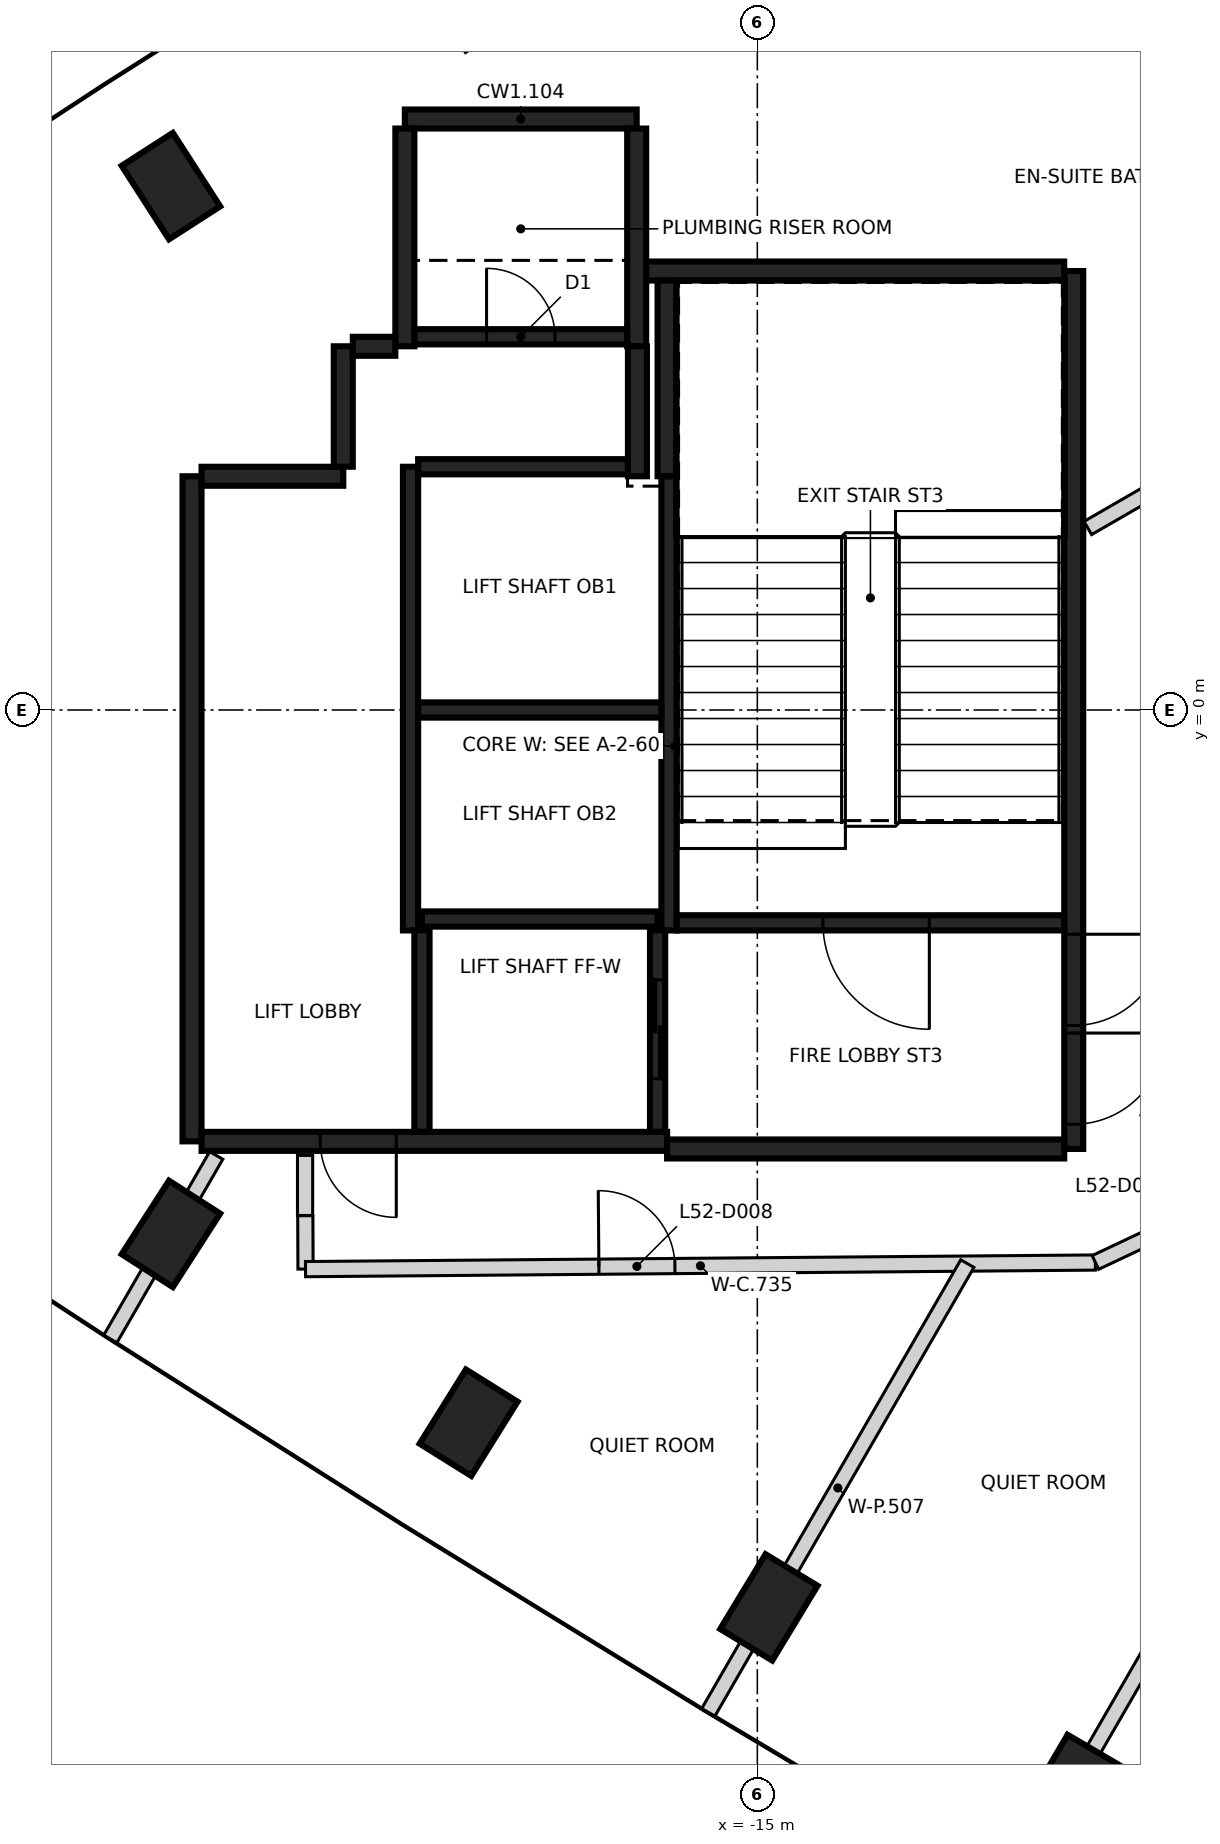
"""IFC4 building model, lengths in metres.
Left out: names, types, materials, properties, quantities, classifications, styles, units other than length and angle.
Written with IfcOpenShell. Run it as: python <this file> out.ifc"""

import sys

from ifc_helpers import new_model, si_unit, direction, frame, frame_2d, origin, origin_2d, place, context, subcontext, project, spatial, rectangle, extrude, element, fill, save


model = new_model("IFC4")
c1 = context("Model", 3, precision=1e-05, world=origin(), true_north=direction((0.0, 1.0)))
c2 = subcontext(c1, "Body", "Model", "MODEL_VIEW")
j1 = project(units=[si_unit("LENGTHUNIT", "METRE"), si_unit("PLANEANGLEUNIT", "RADIAN")], contexts=[c1])
p1 = place(None, origin())
s1 = spatial("IfcSite", under=j1, at=p1, CompositionType="ELEMENT")
p2 = place(p1, origin())
s2 = spatial("IfcBuilding", under=s1, at=p2, CompositionType="ELEMENT")
p3 = place(p2, frame((0.0, 0.0, 208.0)))
s3 = spatial("IfcBuildingStorey", under=s2, at=p3, CompositionType="ELEMENT", Elevation=208.0)
for number, where, z_axis, x_axis in (
    (1, (-22.715, 6.892, -0.35), (0.0, 0.0, 1.0), (-0.541, 0.841, 0.0)),
    (2, (-22.715, -6.892, -0.35), (0.0, 0.0, 1.0), (0.541, 0.841, 0.0)),
    (3, (-18.799, -9.376, -0.35), (0.0, 0.0, 1.0), (0.529, 0.848, 0.0)),
    (4, (-14.848, -11.806, -0.35), (0.0, 0.0, 1.0), (0.518, 0.855, 0.0)),
    (5, (-10.864, -14.18, -0.35), (0.0, 0.0, 1.0), (0.506, 0.862, 0.0)),
):
    element("IfcColumn", number, at=place(p3, frame(where, z_axis=z_axis, x_axis=x_axis)), inside=s3, PredefinedType="COLUMN", context=c2, shape_type="SweptSolid", body=[
        extrude(rectangle(XDim=1.15, YDim=0.8, at=origin_2d()), origin(), (0.0, 0.0, 1.0), 2.736),
    ])
p4 = place(p3, frame((-10.837, 5.775, 0.0), z_axis=(0.0, 0.0, 1.0), x_axis=(0.0, -1.0, 0.0)))
e6 = element("IfcWall", 6, at=p4, inside=s3, PredefinedType="SHEAR", context=c2, shape_type="SweptSolid", body=[
    extrude(rectangle(XDim=11.55, YDim=0.25, at=frame_2d((5.775, 0.0))), origin(), (0.0, 0.0, 1.0), 3.2),
])
p5 = place(p4, frame((10.025, 0.0, 0.0)))
e7 = element("IfcOpeningElement", 7, at=p5, cuts=e6, PredefinedType="OPENING", context=c2, shape_type="SweptSolid", body=[
    extrude(rectangle(XDim=1.2, YDim=2.1, at=frame_2d((0.6, 1.05))), frame((0.0, 0.135, 0.0), z_axis=(0.0, -1.0, 0.0), x_axis=(1.0, 0.0, 0.0)), (0.0, 0.0, 1.0), 0.27),
])
p6 = place(p4, frame((8.725, 0.0, 0.0)))
e8 = element("IfcOpeningElement", 8, at=p6, cuts=e6, PredefinedType="OPENING", context=c2, shape_type="SweptSolid", body=[
    extrude(rectangle(XDim=1.2, YDim=2.1, at=frame_2d((0.6, 1.05))), frame((0.0, 0.135, 0.0), z_axis=(0.0, -1.0, 0.0), x_axis=(1.0, 0.0, 0.0)), (0.0, 0.0, 1.0), 0.27),
])
p7 = place(p3, frame((-22.437, -5.675, 0.0), z_axis=(0.0, 0.0, 1.0), x_axis=(0.0, 1.0, 0.0)))
e9 = element("IfcWall", 9, at=p7, inside=s3, PredefinedType="SHEAR", context=c2, shape_type="SweptSolid", body=[
    extrude(rectangle(XDim=8.75, YDim=0.25, at=frame_2d((4.375, 0.0))), origin(), (0.0, 0.0, 1.0), 3.2),
])
p8 = place(p3, frame((-16.187, -5.675, 0.0), z_axis=(0.0, 0.0, 1.0), x_axis=(-1.0, 0.0, 0.0)))
e10 = element("IfcWall", 10, at=p8, inside=s3, PredefinedType="SHEAR", context=c2, shape_type="SweptSolid", body=[
    extrude(rectangle(XDim=6.125, YDim=0.25, at=frame_2d((3.062, 0.0))), origin(), (0.0, 0.0, 1.0), 3.2),
])
p9 = place(p8, frame((3.563, 0.0, 0.0)))
e11 = element("IfcOpeningElement", 11, at=p9, cuts=e10, PredefinedType="OPENING", context=c2, shape_type="SweptSolid", body=[
    extrude(rectangle(XDim=1.0, YDim=2.1, at=frame_2d((0.5, 1.05))), frame((0.0, 0.135, 0.0), z_axis=(0.0, -1.0, 0.0), x_axis=(1.0, 0.0, 0.0)), (0.0, 0.0, 1.0), 0.27),
])
p10 = place(p3, frame((-10.963, -5.775, 0.0), z_axis=(0.0, 0.0, 1.0), x_axis=(-1.0, 0.0, 0.0)))
e12 = element("IfcWall", 12, at=p10, inside=s3, PredefinedType="SHEAR", context=c2, shape_type="SweptSolid", body=[
    extrude(rectangle(XDim=5.225, YDim=0.25, at=frame_2d((2.612, 0.0))), origin(), (0.0, 0.0, 1.0), 3.2),
])
p11 = place(p3, frame((-16.472, 5.775, 0.0), z_axis=(0.0, 0.0, 1.0), x_axis=(1.0, 0.0, 0.0)))
e13 = element("IfcWall", 13, at=p11, inside=s3, PredefinedType="SHEAR", context=c2, shape_type="SweptSolid", body=[
    extrude(rectangle(XDim=5.51, YDim=0.25, at=frame_2d((2.755, 0.0))), origin(), (0.0, 0.0, 1.0), 3.2),
])
p12 = place(p3, frame((-19.637, 7.775, 0.0), z_axis=(0.0, 0.0, 1.0), x_axis=(1.0, 0.0, 0.0)))
e14 = element("IfcWall", 14, at=p12, inside=s3, PredefinedType="SHEAR", context=c2, shape_type="SweptSolid", body=[
    extrude(rectangle(XDim=3.05, YDim=0.25, at=frame_2d((1.525, 0.0))), origin(), (0.0, 0.0, 1.0), 3.2),
])
for number, where, z_axis, x_axis in (
    (15, (-16.587, 7.65, 0.0), (0.0, 0.0, 1.0), (0.0, -1.0, 0.0)),
    (16, (-19.637, 4.785, 0.0), (0.0, 0.0, 1.0), (0.0, 1.0, 0.0)),
):
    element("IfcWall", number, at=place(p3, frame(where, z_axis=z_axis, x_axis=x_axis)), inside=s3, PredefinedType="SHEAR", context=c2, shape_type="SweptSolid", body=[
        extrude(rectangle(XDim=2.865, YDim=0.25, at=frame_2d((1.432, 0.0))), origin(), (0.0, 0.0, 1.0), 3.2),
    ])
p13 = place(p3, frame((-16.187, 3.075, 0.0), z_axis=(0.0, 0.0, 1.0), x_axis=(0.0, 1.0, 0.0)))
e17 = element("IfcWall", 17, at=p13, inside=s3, PredefinedType="SHEAR", context=c2, shape_type="SweptSolid", body=[
    extrude(rectangle(XDim=2.575, YDim=0.25, at=frame_2d((1.287, 0.0))), origin(), (0.0, 0.0, 1.0), 3.2),
])
p14 = place(p3, frame((-22.312, 3.075, 0.0), z_axis=(0.0, 0.0, 1.0), x_axis=(1.0, 0.0, 0.0)))
e18 = element("IfcWall", 18, at=p14, inside=s3, PredefinedType="SHEAR", context=c2, shape_type="SweptSolid", body=[
    extrude(rectangle(XDim=1.865, YDim=0.25, at=frame_2d((0.932, 0.0))), origin(), (0.0, 0.0, 1.0), 3.2),
])
p15 = place(p3, frame((-16.577, 4.785, 0.0), z_axis=(0.0, 0.0, 1.0), x_axis=(0.0, -1.0, 0.0)))
e19 = element("IfcWall", 19, at=p15, inside=s3, PredefinedType="SHEAR", context=c2, shape_type="SweptSolid", body=[
    extrude(rectangle(XDim=1.71, YDim=0.25, at=frame_2d((0.855, 0.0))), origin(), (0.0, 0.0, 1.0), 3.2),
])
p16 = place(p3, frame((-20.447, 3.2, 0.0), z_axis=(0.0, 0.0, 1.0), x_axis=(0.0, 1.0, 0.0)))
e20 = element("IfcWall", 20, at=p16, inside=s3, PredefinedType="SHEAR", context=c2, shape_type="SweptSolid", body=[
    extrude(rectangle(XDim=1.584, YDim=0.25, at=frame_2d((0.792, 0.0))), origin(), (0.0, 0.0, 1.0), 3.2),
])
p17 = place(p3, frame((-20.322, 4.785, 0.0), z_axis=(0.0, 0.0, 1.0), x_axis=(1.0, 0.0, 0.0)))
e21 = element("IfcWall", 21, at=p17, inside=s3, PredefinedType="SHEAR", context=c2, shape_type="SweptSolid", body=[
    extrude(rectangle(XDim=0.559, YDim=0.25, at=frame_2d((0.28, 0.0))), origin(), (0.0, 0.0, 1.0), 3.2),
])
p18 = place(p3, frame((-16.162, 3.074, 0.0), z_axis=(0.0, 0.0, 1.0), x_axis=(0.0, -1.0, 0.0)))
e22 = element("IfcWall", 22, at=p18, inside=s3, PredefinedType="SHEAR", context=c2, shape_type="SweptSolid", body=[
    extrude(rectangle(XDim=5.974, YDim=0.2, at=frame_2d((2.987, 0.0))), origin(), (0.0, 0.0, 1.0), 3.2),
])
p19 = place(p3, frame((-19.562, -2.9, 0.0), z_axis=(0.0, 0.0, 1.0), x_axis=(0.0, 1.0, 0.0)))
e23 = element("IfcWall", 23, at=p19, inside=s3, PredefinedType="SHEAR", context=c2, shape_type="SweptSolid", body=[
    extrude(rectangle(XDim=6.1, YDim=0.2, at=frame_2d((3.05, 0.0))), origin(), (0.0, 0.0, 1.0), 3.2),
])
p20 = place(p3, frame((-10.963, -2.8, 0.0), z_axis=(0.0, 0.0, 1.0), x_axis=(-1.0, 0.0, 0.0)))
e24 = element("IfcWall", 24, at=p20, inside=s3, PredefinedType="SHEAR", context=c2, shape_type="SweptSolid", body=[
    extrude(rectangle(XDim=5.098, YDim=0.2, at=frame_2d((2.549, 0.0))), origin(), (0.0, 0.0, 1.0), 3.2),
])
p21 = place(p20, frame((1.774, 0.0, 0.0)))
e25 = element("IfcOpeningElement", 25, at=p21, cuts=e24, PredefinedType="OPENING", context=c2, shape_type="SweptSolid", body=[
    extrude(rectangle(XDim=1.4, YDim=2.1, at=frame_2d((0.7, 1.05))), frame((0.0, 0.11, 0.0), z_axis=(0.0, -1.0, 0.0), x_axis=(1.0, 0.0, 0.0)), (0.0, 0.0, 1.0), 0.22),
])
p22 = place(p3, frame((-16.263, 0.0, 0.0), z_axis=(0.0, 0.0, 1.0), x_axis=(-1.0, 0.0, 0.0)))
e26 = element("IfcWall", 26, at=p22, inside=s3, PredefinedType="SHEAR", context=c2, shape_type="SweptSolid", body=[
    extrude(rectangle(XDim=3.198, YDim=0.2, at=frame_2d((1.599, 0.0))), origin(), (0.0, 0.0, 1.0), 3.2),
])
p23 = place(p3, frame((-19.511, 4.91, 0.0), z_axis=(0.0, 0.0, 1.0), x_axis=(1.0, 0.0, 0.0)))
e27 = element("IfcWall", 27, at=p23, inside=s3, PredefinedType="SHEAR", context=c2, shape_type="SweptSolid", body=[
    extrude(rectangle(XDim=2.798, YDim=0.2, at=frame_2d((1.399, 0.0))), origin(), (0.0, 0.0, 1.0), 3.2),
])
p24 = place(p23, frame((0.949, 0.0, 0.0)))
e28 = element("IfcOpeningElement", 28, at=p24, cuts=e27, PredefinedType="OPENING", context=c2, shape_type="SweptSolid", body=[
    extrude(rectangle(XDim=0.9, YDim=2.1, at=frame_2d((0.45, 1.05))), frame((0.0, 0.11, 0.0), z_axis=(0.0, -1.0, 0.0), x_axis=(1.0, 0.0, 0.0)), (0.0, 0.0, 1.0), 0.22),
])
p25 = place(p3, frame((-19.462, 3.2, 0.0), z_axis=(0.0, 0.0, 1.0), x_axis=(1.0, 0.0, 0.0)))
e29 = element("IfcWall", 29, at=p25, inside=s3, PredefinedType="SHEAR", context=c2, shape_type="SweptSolid", body=[
    extrude(rectangle(XDim=2.759, YDim=0.2, at=frame_2d((1.379, 0.0))), origin(), (0.0, 0.0, 1.0), 3.2),
])
p26 = place(p3, frame((-19.412, -2.75, 0.0), z_axis=(0.0, 0.0, 1.0), x_axis=(1.0, 0.0, 0.0)))
e30 = element("IfcWall", 30, at=p26, inside=s3, PredefinedType="SHEAR", context=c2, shape_type="SweptSolid", body=[
    extrude(rectangle(XDim=3.1, YDim=0.2, at=frame_2d((1.55, 0.0))), origin(), (0.0, 0.0, 1.0), 3.2),
])
p27 = place(p3, frame((-16.312, -2.898, 0.0), z_axis=(0.0, 0.0, 1.0), x_axis=(0.0, -1.0, 0.0)))
e31 = element("IfcWall", 31, at=p27, inside=s3, PredefinedType="SHEAR", context=c2, shape_type="SweptSolid", body=[
    extrude(rectangle(XDim=2.651, YDim=0.2, at=frame_2d((1.325, 0.0))), origin(), (0.0, 0.0, 1.0), 3.2),
])
p28 = place(p27, frame((0.652, 0.0, 0.0)))
e32 = element("IfcOpeningElement", 32, at=p28, cuts=e31, PredefinedType="OPENING", context=c2, shape_type="SweptSolid", body=[
    extrude(rectangle(XDim=1.3, YDim=2.1, at=frame_2d((0.65, 1.05))), frame((0.0, 0.11, 0.0), z_axis=(0.0, -1.0, 0.0), x_axis=(1.0, 0.0, 0.0)), (0.0, 0.0, 1.0), 0.22),
])
p29 = place(p3, frame((-19.412, -5.549, 0.0), z_axis=(0.0, 0.0, 1.0), x_axis=(0.0, 1.0, 0.0)))
e33 = element("IfcWall", 33, at=p29, inside=s3, PredefinedType="SHEAR", context=c2, shape_type="SweptSolid", body=[
    extrude(rectangle(XDim=2.651, YDim=0.2, at=frame_2d((1.325, 0.0))), origin(), (0.0, 0.0, 1.0), 3.2),
])
p30 = place(p3, frame((-20.95, -6.65, 0.0), z_axis=(0.0, 0.0, 1.0), x_axis=(0.0, 1.0, 0.0)))
e34 = element("IfcWall", 34, at=p30, inside=s3, PredefinedType="PARTITIONING", context=c2, shape_type="SweptSolid", body=[
    extrude(rectangle(XDim=0.79, YDim=0.2, at=frame_2d((0.395, 0.0))), origin(), (0.0, 0.0, 1.0), 3.2),
])
p31 = place(p3, frame((-20.947, -6.653, 0.0), z_axis=(0.0, 0.0, 1.0), x_axis=(0.004173876686, -0.999991289339, 0.0)))
e35 = element("IfcWall", 35, at=p31, inside=s3, PredefinedType="PARTITIONING", context=c2, shape_type="SweptSolid", body=[
    extrude(rectangle(XDim=0.702, YDim=0.2, at=frame_2d((0.351, 0.0))), origin(), (0.0, 0.0, 1.0), 3.2),
])
p32 = place(p3, frame((-20.944, -7.356, 0.0), z_axis=(0.0, 0.0, 1.0), x_axis=(0.999965021341, 0.008363976025, 0.0)))
e36 = element("IfcWall", 36, at=p32, inside=s3, PredefinedType="PARTITIONING", context=c2, shape_type="SweptSolid", body=[
    extrude(rectangle(XDim=10.391, YDim=0.2, at=frame_2d((5.196, 0.0))), origin(), (0.0, 0.0, 1.0), 3.2),
])
p33 = place(p32, frame((3.86, 0.0, 0.0)))
e37 = element("IfcOpeningElement", 37, at=p33, cuts=e36, PredefinedType="OPENING", context=c2, shape_type="SweptSolid", body=[
    extrude(rectangle(XDim=1.0, YDim=2.1, at=frame_2d((0.5, 1.05))), frame((0.0, 0.11, 0.0), z_axis=(0.0, -1.0, 0.0), x_axis=(1.0, 0.0, 0.0)), (0.0, 0.0, 1.0), 0.22),
])
p34 = place(p3, frame((-10.652, 2.394, 0.0), z_axis=(0.0, 0.0, 1.0), x_axis=(0.866016271077, 0.500015817979, 0.0)))
e38 = element("IfcWall", 38, at=p34, inside=s3, PredefinedType="PARTITIONING", context=c2, shape_type="SweptSolid", body=[
    extrude(rectangle(XDim=12.991, YDim=0.2, at=frame_2d((6.495, 0.0))), origin(), (0.0, 0.0, 1.0), 3.2),
])
p35 = place(p34, frame((5.898, 0.0, 0.0)))
e39 = element("IfcOpeningElement", 39, at=p35, cuts=e38, PredefinedType="OPENING", context=c2, shape_type="SweptSolid", body=[
    extrude(rectangle(XDim=0.95, YDim=2.1, at=frame_2d((0.475, 1.05))), frame((0.0, 0.11, 0.0), z_axis=(0.0, -1.0, 0.0), x_axis=(1.0, 0.0, 0.0)), (0.0, 0.0, 1.0), 0.22),
])
p36 = place(p34, frame((1.571, 0.0, 0.0)))
e40 = element("IfcOpeningElement", 40, at=p36, cuts=e38, PredefinedType="OPENING", context=c2, shape_type="SweptSolid", body=[
    extrude(rectangle(XDim=0.95, YDim=2.1, at=frame_2d((0.475, 1.05))), frame((0.0, 0.11, 0.0), z_axis=(0.0, -1.0, 0.0), x_axis=(1.0, 0.0, 0.0)), (0.0, 0.0, 1.0), 0.22),
])
p37 = place(p3, frame((-10.552, -7.268, 0.0), z_axis=(0.0, 0.0, 1.0), x_axis=(0.904331815333, 0.426830139255, 0.0)))
e41 = element("IfcWall", 41, at=p37, inside=s3, PredefinedType="PARTITIONING", context=c2, shape_type="SweptSolid", body=[
    extrude(rectangle(XDim=0.944, YDim=0.2, at=frame_2d((0.472, 0.0))), origin(), (0.0, 0.0, 1.0), 3.2),
])
p38 = place(p3, frame((-23.512, -8.274, 0.0), z_axis=(0.0, 0.0, 1.0), x_axis=(0.499944854726, 0.866057239582, 0.0)))
e42 = element("IfcWall", 42, at=p38, inside=s3, PredefinedType="PARTITIONING", context=c2, shape_type="SweptSolid", body=[
    extrude(rectangle(XDim=2.787, YDim=0.2, at=frame_2d((1.394, 0.0))), origin(), (0.0, 0.0, 1.0), 3.2),
])
p39 = place(p3, frame((-15.645, -13.187, 0.0), z_axis=(0.0, 0.0, 1.0), x_axis=(0.499921913572, 0.866070482311, 0.0)))
e43 = element("IfcWall", 43, at=p39, inside=s3, PredefinedType="PARTITIONING", context=c2, shape_type="SweptSolid", body=[
    extrude(rectangle(XDim=6.816, YDim=0.2, at=frame_2d((3.408, 0.0))), origin(), (0.0, 0.0, 1.0), 3.2),
])
for number, where, z_axis, x_axis in (
    (44, (-11.661, -15.561, 0.0), (0.0, 0.0, 1.0), (0.5, 0.866, 0.0)),
    (45, (-11.661, 15.561, 0.0), (0.0, 0.0, 1.0), (0.5, -0.866, 0.0)),
):
    element("IfcWall", number, at=place(p3, frame(where, z_axis=z_axis, x_axis=x_axis)), inside=s3, PredefinedType="PARTITIONING", context=c2, shape_type="SweptSolid", body=[
        extrude(rectangle(XDim=11.907, YDim=0.2, at=frame_2d((5.953, 0.0))), origin(), (0.0, 0.0, 1.0), 3.2),
    ])
p40 = place(p28, origin())
e46 = element("IfcDoor", 46, at=p40, inside=s3, OperationType="SLIDING_TO_RIGHT", PredefinedType="DOOR", context=c2, shape_type="SweptSolid", body=[
    extrude(rectangle(XDim=1.3, YDim=2.1, at=frame_2d((0.65, 1.05))), frame((0.0, 0.025, 0.0), z_axis=(0.0, -1.0, 0.0), x_axis=(1.0, 0.0, 0.0)), (0.0, 0.0, 1.0), 0.05),
])
fill(e32, e46)
p41 = place(p9, origin())
e47 = element("IfcDoor", 47, at=p41, inside=s3, OperationType="SINGLE_SWING_LEFT", PredefinedType="DOOR", context=c2, shape_type="SweptSolid", body=[
    extrude(rectangle(XDim=1.0, YDim=2.1, at=frame_2d((0.5, 1.05))), frame((0.0, 0.025, 0.0), z_axis=(0.0, -1.0, 0.0), x_axis=(1.0, 0.0, 0.0)), (0.0, 0.0, 1.0), 0.05),
])
fill(e11, e47)
p42 = place(p5, origin())
e48 = element("IfcDoor", 48, at=p42, inside=s3, OperationType="SINGLE_SWING_LEFT", PredefinedType="DOOR", context=c2, shape_type="SweptSolid", body=[
    extrude(rectangle(XDim=1.2, YDim=2.1, at=frame_2d((0.6, 1.05))), frame((0.0, 0.025, 0.0), z_axis=(0.0, -1.0, 0.0), x_axis=(1.0, 0.0, 0.0)), (0.0, 0.0, 1.0), 0.05),
])
fill(e7, e48)
p43 = place(p6, origin())
e49 = element("IfcDoor", 49, at=p43, inside=s3, OperationType="SINGLE_SWING_RIGHT", PredefinedType="DOOR", context=c2, shape_type="SweptSolid", body=[
    extrude(rectangle(XDim=1.2, YDim=2.1, at=frame_2d((0.6, 1.05))), frame((0.0, 0.025, 0.0), z_axis=(0.0, -1.0, 0.0), x_axis=(1.0, 0.0, 0.0)), (0.0, 0.0, 1.0), 0.05),
])
fill(e8, e49)
p44 = place(p21, origin())
e50 = element("IfcDoor", 50, at=p44, inside=s3, OperationType="SINGLE_SWING_RIGHT", PredefinedType="DOOR", context=c2, shape_type="SweptSolid", body=[
    extrude(rectangle(XDim=1.4, YDim=2.1, at=frame_2d((0.7, 1.05))), frame((0.0, 0.025, 0.0), z_axis=(0.0, -1.0, 0.0), x_axis=(1.0, 0.0, 0.0)), (0.0, 0.0, 1.0), 0.05),
])
fill(e25, e50)
p45 = place(p24, origin())
e51 = element("IfcDoor", 51, at=p45, inside=s3, OperationType="SINGLE_SWING_LEFT", PredefinedType="DOOR", context=c2, shape_type="SweptSolid", body=[
    extrude(rectangle(XDim=0.9, YDim=2.1, at=frame_2d((0.45, 1.05))), frame((0.0, 0.025, 0.0), z_axis=(0.0, -1.0, 0.0), x_axis=(1.0, 0.0, 0.0)), (0.0, 0.0, 1.0), 0.05),
])
fill(e28, e51)
p46 = place(p33, frame((1.0, 0.0, 0.0), z_axis=(0.0, 0.0, 1.0), x_axis=(-1.0, 0.0, 0.0)))
e52 = element("IfcDoor", 52, at=p46, inside=s3, OperationType="SINGLE_SWING_LEFT", PredefinedType="DOOR", context=c2, shape_type="SweptSolid", body=[
    extrude(rectangle(XDim=1.0, YDim=2.1, at=frame_2d((0.5, 1.05))), frame((0.0, 0.025, 0.0), z_axis=(0.0, -1.0, 0.0), x_axis=(1.0, 0.0, 0.0)), (0.0, 0.0, 1.0), 0.05),
])
fill(e37, e52)
save(model, sys.argv[1])
